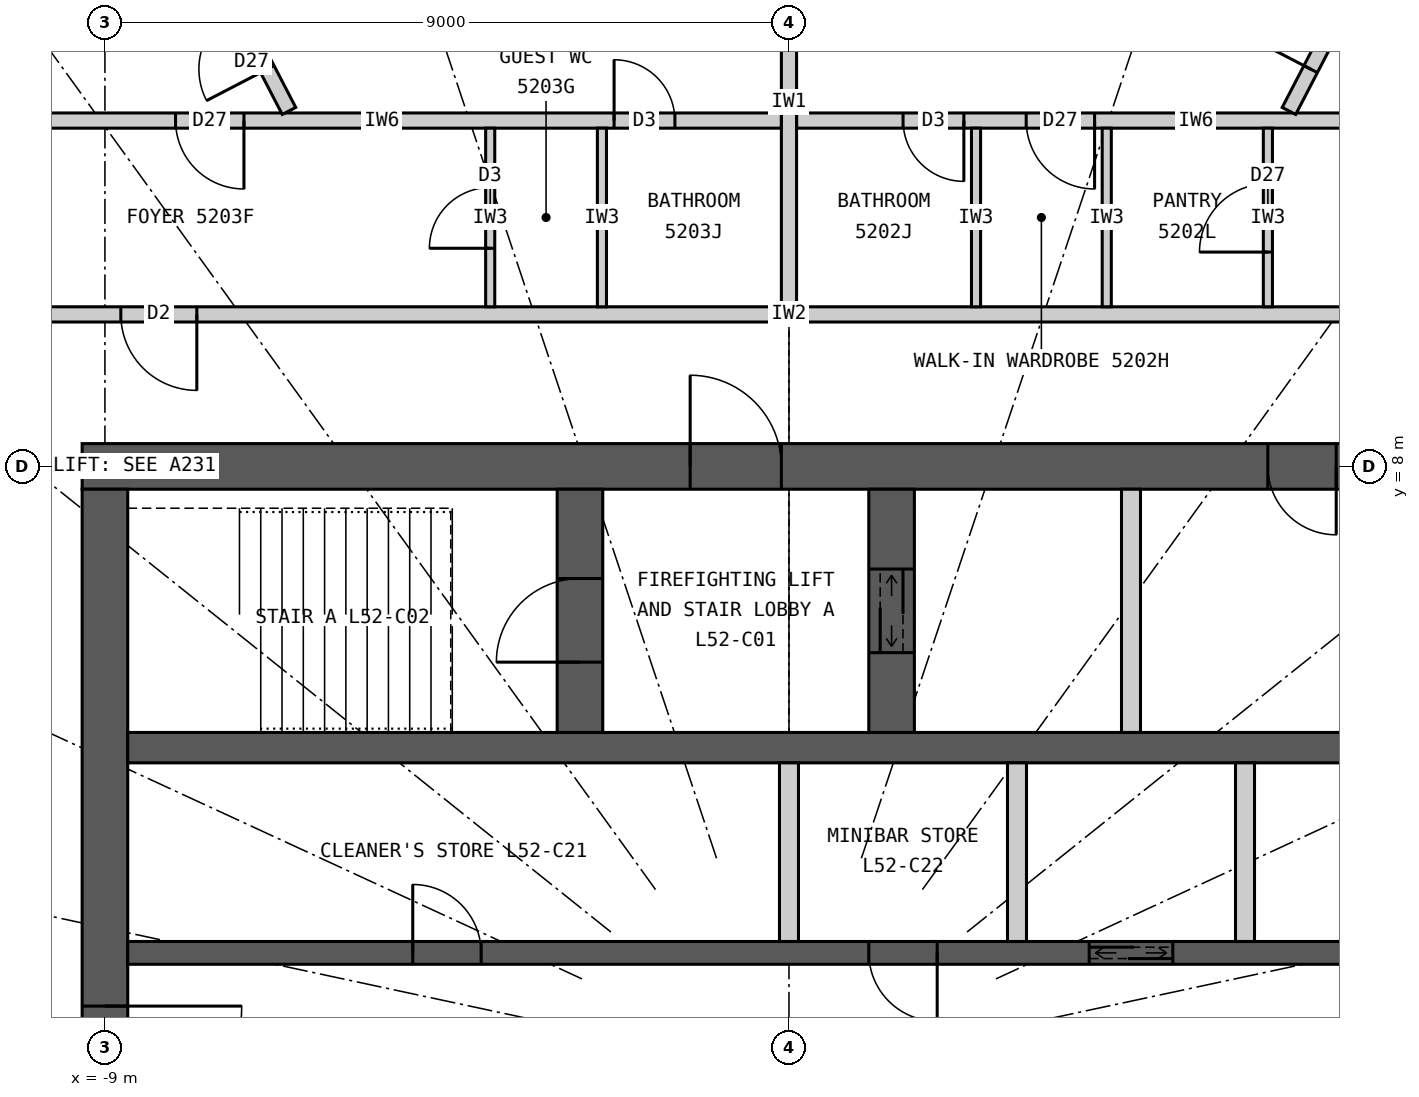
"""IFC4 building model, lengths in metres.
Left out: names, types, materials, properties, quantities, classifications, styles, units other than length and angle.
Written with IfcOpenShell. Run it as: python <this file> out.ifc"""

import sys

from ifc_helpers import new_model, si_unit, direction, frame, frame_2d, origin, origin_2d, place, context, subcontext, project, spatial, rectangle, circle, extrude, element, fill, save


model = new_model("IFC4")
c1 = context("Model", 3, precision=1e-05, world=origin(), true_north=direction((0.0, 1.0)))
c2 = subcontext(c1, "Body", "Model", "MODEL_VIEW")
j1 = project(units=[si_unit("LENGTHUNIT", "METRE"), si_unit("PLANEANGLEUNIT", "RADIAN")], contexts=[c1])
p1 = place(None, origin())
s1 = spatial("IfcSite", under=j1, at=p1, CompositionType="ELEMENT")
p2 = place(p1, origin())
s2 = spatial("IfcBuilding", under=s1, at=p2, CompositionType="ELEMENT")
p3 = place(p2, frame((0.0, 0.0, 196.2)))
s3 = spatial("IfcBuildingStorey", under=s2, at=p3, CompositionType="ELEMENT", Elevation=196.2)
p4 = place(p3, frame((-10.019, 13.883, 0.0), z_axis=(0.0, 0.0, 1.0), x_axis=(1.0, 0.0, 0.0)))
e1 = element("IfcColumn", 1, at=p4, inside=s3, PredefinedType="COLUMN", context=c2, shape_type="SweptSolid", body=[
    extrude(circle(Radius=0.45, at=origin_2d()), origin(), (0.0, 0.0, 1.0), 3.3),
])
p5 = place(p3, frame((-9.3, 8.0, 0.0), z_axis=(0.0, 0.0, 1.0), x_axis=(1.0, 0.0, 0.0)))
e2 = element("IfcWall", 2, at=p5, inside=s3, PredefinedType="SHEAR", context=c2, shape_type="SweptSolid", body=[
    extrude(rectangle(XDim=18.6, YDim=0.6, at=frame_2d((9.3, 0.0))), origin(), (0.0, 0.0, 1.0), 3.3),
])
p6 = place(p5, frame((8.0, 0.0, 0.0)))
e3 = element("IfcOpeningElement", 3, at=p6, cuts=e2, PredefinedType="OPENING", context=c2, shape_type="SweptSolid", body=[
    extrude(rectangle(XDim=1.2, YDim=2.2, at=frame_2d((0.6, 1.1))), frame((0.0, 0.31, 0.0), z_axis=(0.0, -1.0, 0.0), x_axis=(1.0, 0.0, 0.0)), (0.0, 0.0, 1.0), 0.62),
])
p7 = place(p5, frame((15.6, 0.0, 0.0)))
e4 = element("IfcOpeningElement", 4, at=p7, cuts=e2, PredefinedType="OPENING", context=c2, shape_type="SweptSolid", body=[
    extrude(rectangle(XDim=0.9, YDim=2.2, at=frame_2d((0.45, 1.1))), frame((0.0, 0.31, 0.0), z_axis=(0.0, -1.0, 0.0), x_axis=(1.0, 0.0, 0.0)), (0.0, 0.0, 1.0), 0.62),
])
p8 = place(p3, frame((-9.0, 7.7, 0.0), z_axis=(0.0, 0.0, 1.0), x_axis=(0.0, -1.0, 0.0)))
e5 = element("IfcWall", 5, at=p8, inside=s3, PredefinedType="SHEAR", context=c2, shape_type="SweptSolid", body=[
    extrude(rectangle(XDim=15.4, YDim=0.6, at=frame_2d((7.7, 0.0))), origin(), (0.0, 0.0, 1.0), 3.3),
])
p9 = place(p8, frame((6.8, 0.0, 0.0)))
e6 = element("IfcOpeningElement", 6, at=p9, cuts=e5, PredefinedType="OPENING", context=c2, shape_type="SweptSolid", body=[
    extrude(rectangle(XDim=1.8, YDim=2.2, at=frame_2d((0.9, 1.1))), frame((0.0, 0.31, 0.0), z_axis=(0.0, -1.0, 0.0), x_axis=(1.0, 0.0, 0.0)), (0.0, 0.0, 1.0), 0.62),
])
p10 = place(p3, frame((-8.7, 4.3, 0.0), z_axis=(0.0, 0.0, 1.0), x_axis=(1.0, 0.0, 0.0)))
e7 = element("IfcWall", 7, at=p10, inside=s3, PredefinedType="SHEAR", context=c2, shape_type="SweptSolid", body=[
    extrude(rectangle(XDim=17.4, YDim=0.4, at=frame_2d((8.7, 0.0))), origin(), (0.0, 0.0, 1.0), 3.3),
])
p11 = place(p3, frame((-8.7, 1.6, 0.0), z_axis=(0.0, 0.0, 1.0), x_axis=(1.0, 0.0, 0.0)))
e8 = element("IfcWall", 8, at=p11, inside=s3, PredefinedType="SHEAR", context=c2, shape_type="SweptSolid", body=[
    extrude(rectangle(XDim=17.4, YDim=0.3, at=frame_2d((8.7, 0.0))), origin(), (0.0, 0.0, 1.0), 3.3),
])
p12 = place(p11, frame((12.65, 0.0, 0.0)))
e9 = element("IfcOpeningElement", 9, at=p12, cuts=e8, PredefinedType="OPENING", context=c2, shape_type="SweptSolid", body=[
    extrude(rectangle(XDim=1.1, YDim=2.2, at=frame_2d((0.55, 1.1))), frame((0.0, 0.16, 0.0), z_axis=(0.0, -1.0, 0.0), x_axis=(1.0, 0.0, 0.0)), (0.0, 0.0, 1.0), 0.32),
])
p13 = place(p11, frame((3.75, 0.0, 0.0)))
e10 = element("IfcOpeningElement", 10, at=p13, cuts=e8, PredefinedType="OPENING", context=c2, shape_type="SweptSolid", body=[
    extrude(rectangle(XDim=0.9, YDim=2.2, at=frame_2d((0.45, 1.1))), frame((0.0, 0.16, 0.0), z_axis=(0.0, -1.0, 0.0), x_axis=(1.0, 0.0, 0.0)), (0.0, 0.0, 1.0), 0.32),
])
p14 = place(p11, frame((9.75, 0.0, 0.0)))
e11 = element("IfcOpeningElement", 11, at=p14, cuts=e8, PredefinedType="OPENING", context=c2, shape_type="SweptSolid", body=[
    extrude(rectangle(XDim=0.9, YDim=2.2, at=frame_2d((0.45, 1.1))), frame((0.0, 0.16, 0.0), z_axis=(0.0, -1.0, 0.0), x_axis=(1.0, 0.0, 0.0)), (0.0, 0.0, 1.0), 0.32),
])
p15 = place(p3, frame((-2.75, 4.5, 0.0), z_axis=(0.0, 0.0, 1.0), x_axis=(0.0, 1.0, 0.0)))
e12 = element("IfcWall", 12, at=p15, inside=s3, PredefinedType="SHEAR", context=c2, shape_type="SweptSolid", body=[
    extrude(rectangle(XDim=3.2, YDim=0.6, at=frame_2d((1.6, 0.0))), origin(), (0.0, 0.0, 1.0), 3.3),
])
p16 = place(p15, frame((0.925, 0.0, 0.0)))
e13 = element("IfcOpeningElement", 13, at=p16, cuts=e12, PredefinedType="OPENING", context=c2, shape_type="SweptSolid", body=[
    extrude(rectangle(XDim=1.1, YDim=2.2, at=frame_2d((0.55, 1.1))), frame((0.0, 0.31, 0.0), z_axis=(0.0, -1.0, 0.0), x_axis=(1.0, 0.0, 0.0)), (0.0, 0.0, 1.0), 0.62),
])
p17 = place(p3, frame((1.35, 4.5, 0.0), z_axis=(0.0, 0.0, 1.0), x_axis=(0.0, 1.0, 0.0)))
e14 = element("IfcWall", 14, at=p17, inside=s3, PredefinedType="SHEAR", context=c2, shape_type="SweptSolid", body=[
    extrude(rectangle(XDim=3.2, YDim=0.6, at=frame_2d((1.6, 0.0))), origin(), (0.0, 0.0, 1.0), 3.3),
])
p18 = place(p17, frame((1.05, 0.0, 0.0)))
e15 = element("IfcOpeningElement", 15, at=p18, cuts=e14, PredefinedType="OPENING", context=c2, shape_type="SweptSolid", body=[
    extrude(rectangle(XDim=1.1, YDim=2.2, at=frame_2d((0.55, 1.1))), frame((0.0, 0.31, 0.0), z_axis=(0.0, -1.0, 0.0), x_axis=(1.0, 0.0, 0.0)), (0.0, 0.0, 1.0), 0.62),
])
p19 = place(p3, frame((4.5, 4.5, 0.0), z_axis=(0.0, 0.0, 1.0), x_axis=(0.0, 1.0, 0.0)))
e16 = element("IfcWall", 16, at=p19, inside=s3, PredefinedType="PARTITIONING", context=c2, shape_type="SweptSolid", body=[
    extrude(rectangle(XDim=3.2, YDim=0.25, at=frame_2d((1.6, 0.0))), origin(), (0.0, 0.0, 1.0), 3.3),
])
for number, where, z_axis, x_axis in (
    (17, (0.0, 1.75, 0.0), (0.0, 0.0, 1.0), (0.0, 1.0, 0.0)),
    (18, (3.0, 1.75, 0.0), (0.0, 0.0, 1.0), (0.0, 1.0, 0.0)),
    (19, (6.0, 1.75, 0.0), (0.0, 0.0, 1.0), (0.0, 1.0, 0.0)),
):
    element("IfcWall", number, at=place(p3, frame(where, z_axis=z_axis, x_axis=x_axis)), inside=s3, PredefinedType="PARTITIONING", context=c2, shape_type="SweptSolid", body=[
        extrude(rectangle(XDim=2.35, YDim=0.25, at=frame_2d((1.175, 0.0))), origin(), (0.0, 0.0, 1.0), 3.3),
    ])
p20 = place(p3, frame((-11.1, 10.0, 0.0), z_axis=(0.0, 0.0, 1.0), x_axis=(1.0, 0.0, 0.0)))
e20 = element("IfcWall", 20, at=p20, inside=s3, PredefinedType="PARTITIONING", context=c2, shape_type="SweptSolid", body=[
    extrude(rectangle(XDim=22.2, YDim=0.2, at=frame_2d((11.1, 0.0))), origin(), (0.0, 0.0, 1.0), 3.12),
])
p21 = place(p20, frame((2.309, 0.0, 0.0)))
e21 = element("IfcOpeningElement", 21, at=p21, cuts=e20, PredefinedType="OPENING", context=c2, shape_type="SweptSolid", body=[
    extrude(rectangle(XDim=1.0, YDim=2.2, at=frame_2d((0.5, 1.1))), frame((0.0, 0.11, 0.0), z_axis=(0.0, -1.0, 0.0), x_axis=(1.0, 0.0, 0.0)), (0.0, 0.0, 1.0), 0.22),
])
p22 = place(p3, frame((0.0, 10.1, 0.0), z_axis=(0.0, 0.0, 1.0), x_axis=(0.0, 1.0, 0.0)))
e22 = element("IfcWall", 22, at=p22, inside=s3, PredefinedType="PARTITIONING", context=c2, shape_type="SweptSolid", body=[
    extrude(rectangle(XDim=5.4, YDim=0.2, at=frame_2d((2.7, 0.0))), origin(), (0.0, 0.0, 1.0), 2.42),
])
p23 = place(p3, frame((10.609, 12.55, 0.0), z_axis=(0.0, 0.0, 1.0), x_axis=(-1.0, 0.0, 0.0)))
e23 = element("IfcWall", 23, at=p23, inside=s3, PredefinedType="PARTITIONING", context=c2, shape_type="SweptSolid", body=[
    extrude(rectangle(XDim=10.508, YDim=0.2, at=frame_2d((5.254, 0.0))), origin(), (0.0, 0.0, 1.0), 3.12),
])
p24 = place(p23, frame((6.588, 0.0, 0.0)))
e24 = element("IfcOpeningElement", 24, at=p24, cuts=e23, PredefinedType="OPENING", context=c2, shape_type="SweptSolid", body=[
    extrude(rectangle(XDim=0.9, YDim=2.1, at=frame_2d((0.45, 1.05))), frame((0.0, 0.11, 0.0), z_axis=(0.0, -1.0, 0.0), x_axis=(1.0, 0.0, 0.0)), (0.0, 0.0, 1.0), 0.22),
])
p25 = place(p23, frame((8.308, 0.0, 0.0)))
e25 = element("IfcOpeningElement", 25, at=p25, cuts=e23, PredefinedType="OPENING", context=c2, shape_type="SweptSolid", body=[
    extrude(rectangle(XDim=0.8, YDim=2.1, at=frame_2d((0.4, 1.05))), frame((0.0, 0.11, 0.0), z_axis=(0.0, -1.0, 0.0), x_axis=(1.0, 0.0, 0.0)), (0.0, 0.0, 1.0), 0.22),
])
p26 = place(p3, frame((6.578, 12.677, 0.0), z_axis=(0.0, 0.0, 1.0), x_axis=(0.460620531465, 0.887597164255, 0.0)))
e26 = element("IfcWall", 26, at=p26, inside=s3, PredefinedType="PARTITIONING", context=c2, shape_type="SweptSolid", body=[
    extrude(rectangle(XDim=2.678, YDim=0.2, at=frame_2d((1.339, 0.0))), origin(), (0.0, 0.0, 1.0), 3.12),
])
p27 = place(p26, frame((0.62, 0.0, 0.0)))
e27 = element("IfcOpeningElement", 27, at=p27, cuts=e26, PredefinedType="OPENING", context=c2, shape_type="SweptSolid", body=[
    extrude(rectangle(XDim=0.9, YDim=2.1, at=frame_2d((0.45, 1.05))), frame((0.0, 0.11, 0.0), z_axis=(0.0, -1.0, 0.0), x_axis=(1.0, 0.0, 0.0)), (0.0, 0.0, 1.0), 0.22),
])
p28 = place(p3, frame((6.301, 10.1, 0.0), z_axis=(0.0, 0.0, 1.0), x_axis=(0.0, 1.0, 0.0)))
e28 = element("IfcWall", 28, at=p28, inside=s3, PredefinedType="PARTITIONING", context=c2, shape_type="SweptSolid", body=[
    extrude(rectangle(XDim=2.35, YDim=0.12, at=frame_2d((1.175, 0.0))), origin(), (0.0, 0.0, 1.0), 3.12),
])
p29 = place(p28, frame((0.72, 0.0, 0.0)))
e29 = element("IfcOpeningElement", 29, at=p29, cuts=e28, PredefinedType="OPENING", context=c2, shape_type="SweptSolid", body=[
    extrude(rectangle(XDim=0.9, YDim=2.1, at=frame_2d((0.45, 1.05))), frame((0.0, 0.07, 0.0), z_axis=(0.0, -1.0, 0.0), x_axis=(1.0, 0.0, 0.0)), (0.0, 0.0, 1.0), 0.14),
])
for number, where, z_axis, x_axis in (
    (30, (4.181, 10.1, 0.0), (0.0, 0.0, 1.0), (0.0, 1.0, 0.0)),
    (31, (2.461, 10.1, 0.0), (0.0, 0.0, 1.0), (0.0, 1.0, 0.0)),
):
    element("IfcWall", number, at=place(p3, frame(where, z_axis=z_axis, x_axis=x_axis)), inside=s3, PredefinedType="PARTITIONING", context=c2, shape_type="SweptSolid", body=[
        extrude(rectangle(XDim=2.35, YDim=0.12, at=frame_2d((1.175, 0.0))), origin(), (0.0, 0.0, 1.0), 3.12),
    ])
p30 = place(p3, frame((-0.101, 12.55, 0.0), z_axis=(0.0, 0.0, 1.0), x_axis=(-1.0, 0.0, 0.0)))
e32 = element("IfcWall", 32, at=p30, inside=s3, PredefinedType="PARTITIONING", context=c2, shape_type="SweptSolid", body=[
    extrude(rectangle(XDim=10.508, YDim=0.2, at=frame_2d((5.254, 0.0))), origin(), (0.0, 0.0, 1.0), 3.12),
])
p31 = place(p30, frame((1.4, 0.0, 0.0)))
e33 = element("IfcOpeningElement", 33, at=p31, cuts=e32, PredefinedType="OPENING", context=c2, shape_type="SweptSolid", body=[
    extrude(rectangle(XDim=0.8, YDim=2.1, at=frame_2d((0.4, 1.05))), frame((0.0, 0.11, 0.0), z_axis=(0.0, -1.0, 0.0), x_axis=(1.0, 0.0, 0.0)), (0.0, 0.0, 1.0), 0.22),
])
p32 = place(p30, frame((7.07, 0.0, 0.0)))
e34 = element("IfcOpeningElement", 34, at=p32, cuts=e32, PredefinedType="OPENING", context=c2, shape_type="SweptSolid", body=[
    extrude(rectangle(XDim=0.9, YDim=2.1, at=frame_2d((0.45, 1.05))), frame((0.0, 0.11, 0.0), z_axis=(0.0, -1.0, 0.0), x_axis=(1.0, 0.0, 0.0)), (0.0, 0.0, 1.0), 0.22),
])
p33 = place(p3, frame((-6.578, 12.677, 0.0), z_axis=(0.0, 0.0, 1.0), x_axis=(-0.460620531465, 0.887597164255, 0.0)))
e35 = element("IfcWall", 35, at=p33, inside=s3, PredefinedType="PARTITIONING", context=c2, shape_type="SweptSolid", body=[
    extrude(rectangle(XDim=2.678, YDim=0.2, at=frame_2d((1.339, 0.0))), origin(), (0.0, 0.0, 1.0), 3.12),
])
p34 = place(p33, frame((0.62, 0.0, 0.0)))
e36 = element("IfcOpeningElement", 36, at=p34, cuts=e35, PredefinedType="OPENING", context=c2, shape_type="SweptSolid", body=[
    extrude(rectangle(XDim=0.9, YDim=2.1, at=frame_2d((0.45, 1.05))), frame((0.0, 0.11, 0.0), z_axis=(0.0, -1.0, 0.0), x_axis=(1.0, 0.0, 0.0)), (0.0, 0.0, 1.0), 0.22),
])
p35 = place(p3, frame((-2.461, 10.1, 0.0), z_axis=(0.0, 0.0, 1.0), x_axis=(0.0, 1.0, 0.0)))
e37 = element("IfcWall", 37, at=p35, inside=s3, PredefinedType="PARTITIONING", context=c2, shape_type="SweptSolid", body=[
    extrude(rectangle(XDim=2.35, YDim=0.12, at=frame_2d((1.175, 0.0))), origin(), (0.0, 0.0, 1.0), 3.12),
])
p36 = place(p3, frame((-3.931, 10.1, 0.0), z_axis=(0.0, 0.0, 1.0), x_axis=(0.0, 1.0, 0.0)))
e38 = element("IfcWall", 38, at=p36, inside=s3, PredefinedType="PARTITIONING", context=c2, shape_type="SweptSolid", body=[
    extrude(rectangle(XDim=2.35, YDim=0.12, at=frame_2d((1.175, 0.0))), origin(), (0.0, 0.0, 1.0), 3.12),
])
p37 = place(p36, frame((0.77, 0.0, 0.0)))
e39 = element("IfcOpeningElement", 39, at=p37, cuts=e38, PredefinedType="OPENING", context=c2, shape_type="SweptSolid", body=[
    extrude(rectangle(XDim=0.8, YDim=2.1, at=frame_2d((0.4, 1.05))), frame((0.0, 0.07, 0.0), z_axis=(0.0, -1.0, 0.0), x_axis=(1.0, 0.0, 0.0)), (0.0, 0.0, 1.0), 0.14),
])
p38 = place(p29, origin())
e40 = element("IfcDoor", 40, at=p38, inside=s3, OperationType="SINGLE_SWING_LEFT", PredefinedType="DOOR", context=c2, shape_type="SweptSolid", body=[
    extrude(rectangle(XDim=0.9, YDim=2.1, at=frame_2d((0.45, 1.05))), frame((0.0, 0.025, 0.0), z_axis=(0.0, -1.0, 0.0), x_axis=(1.0, 0.0, 0.0)), (0.0, 0.0, 1.0), 0.05),
])
fill(e29, e40)
p39 = place(p24, origin())
e41 = element("IfcDoor", 41, at=p39, inside=s3, OperationType="SINGLE_SWING_LEFT", PredefinedType="DOOR", context=c2, shape_type="SweptSolid", body=[
    extrude(rectangle(XDim=0.9, YDim=2.1, at=frame_2d((0.45, 1.05))), frame((0.0, 0.025, 0.0), z_axis=(0.0, -1.0, 0.0), x_axis=(1.0, 0.0, 0.0)), (0.0, 0.0, 1.0), 0.05),
])
fill(e24, e41)
p40 = place(p25, origin())
e42 = element("IfcDoor", 42, at=p40, inside=s3, OperationType="SINGLE_SWING_LEFT", PredefinedType="DOOR", context=c2, shape_type="SweptSolid", body=[
    extrude(rectangle(XDim=0.8, YDim=2.1, at=frame_2d((0.4, 1.05))), frame((0.0, 0.025, 0.0), z_axis=(0.0, -1.0, 0.0), x_axis=(1.0, 0.0, 0.0)), (0.0, 0.0, 1.0), 0.05),
])
fill(e25, e42)
p41 = place(p27, origin())
e43 = element("IfcDoor", 43, at=p41, inside=s3, OperationType="SINGLE_SWING_LEFT", PredefinedType="DOOR", context=c2, shape_type="SweptSolid", body=[
    extrude(rectangle(XDim=0.9, YDim=2.1, at=frame_2d((0.45, 1.05))), frame((0.0, 0.025, 0.0), z_axis=(0.0, -1.0, 0.0), x_axis=(1.0, 0.0, 0.0)), (0.0, 0.0, 1.0), 0.05),
])
fill(e27, e43)
p42 = place(p21, origin())
e44 = element("IfcDoor", 44, at=p42, inside=s3, OperationType="SINGLE_SWING_RIGHT", PredefinedType="DOOR", context=c2, shape_type="SweptSolid", body=[
    extrude(rectangle(XDim=1.0, YDim=2.2, at=frame_2d((0.5, 1.1))), frame((0.0, 0.025, 0.0), z_axis=(0.0, -1.0, 0.0), x_axis=(1.0, 0.0, 0.0)), (0.0, 0.0, 1.0), 0.05),
])
fill(e21, e44)
p43 = place(p31, origin())
e45 = element("IfcDoor", 45, at=p43, inside=s3, OperationType="SINGLE_SWING_RIGHT", PredefinedType="DOOR", context=c2, shape_type="SweptSolid", body=[
    extrude(rectangle(XDim=0.8, YDim=2.1, at=frame_2d((0.4, 1.05))), frame((0.0, 0.025, 0.0), z_axis=(0.0, -1.0, 0.0), x_axis=(1.0, 0.0, 0.0)), (0.0, 0.0, 1.0), 0.05),
])
fill(e33, e45)
p44 = place(p37, origin())
e46 = element("IfcDoor", 46, at=p44, inside=s3, OperationType="SINGLE_SWING_LEFT", PredefinedType="DOOR", context=c2, shape_type="SweptSolid", body=[
    extrude(rectangle(XDim=0.8, YDim=2.1, at=frame_2d((0.4, 1.05))), frame((0.0, 0.025, 0.0), z_axis=(0.0, -1.0, 0.0), x_axis=(1.0, 0.0, 0.0)), (0.0, 0.0, 1.0), 0.05),
])
fill(e39, e46)
p45 = place(p32, origin())
e47 = element("IfcDoor", 47, at=p45, inside=s3, OperationType="SINGLE_SWING_LEFT", PredefinedType="DOOR", context=c2, shape_type="SweptSolid", body=[
    extrude(rectangle(XDim=0.9, YDim=2.1, at=frame_2d((0.45, 1.05))), frame((0.0, 0.025, 0.0), z_axis=(0.0, -1.0, 0.0), x_axis=(1.0, 0.0, 0.0)), (0.0, 0.0, 1.0), 0.05),
])
fill(e34, e47)
p46 = place(p34, origin())
e48 = element("IfcDoor", 48, at=p46, inside=s3, OperationType="SINGLE_SWING_LEFT", PredefinedType="DOOR", context=c2, shape_type="SweptSolid", body=[
    extrude(rectangle(XDim=0.9, YDim=2.1, at=frame_2d((0.45, 1.05))), frame((0.0, 0.025, 0.0), z_axis=(0.0, -1.0, 0.0), x_axis=(1.0, 0.0, 0.0)), (0.0, 0.0, 1.0), 0.05),
])
fill(e36, e48)
p47 = place(p6, origin())
e49 = element("IfcDoor", 49, at=p47, inside=s3, OperationType="SINGLE_SWING_LEFT", PredefinedType="DOOR", context=c2, shape_type="SweptSolid", body=[
    extrude(rectangle(XDim=1.2, YDim=2.2, at=frame_2d((0.6, 1.1))), frame((0.0, 0.025, 0.0), z_axis=(0.0, -1.0, 0.0), x_axis=(1.0, 0.0, 0.0)), (0.0, 0.0, 1.0), 0.05),
])
fill(e3, e49)
p48 = place(p16, origin())
e50 = element("IfcDoor", 50, at=p48, inside=s3, OperationType="SINGLE_SWING_LEFT", PredefinedType="DOOR", context=c2, shape_type="SweptSolid", body=[
    extrude(rectangle(XDim=1.1, YDim=2.2, at=frame_2d((0.55, 1.1))), frame((0.0, 0.025, 0.0), z_axis=(0.0, -1.0, 0.0), x_axis=(1.0, 0.0, 0.0)), (0.0, 0.0, 1.0), 0.05),
])
fill(e13, e50)
p49 = place(p18, origin())
e51 = element("IfcDoor", 51, at=p49, inside=s3, OperationType="DOUBLE_DOOR_SLIDING", PredefinedType="DOOR", context=c2, shape_type="SweptSolid", body=[
    extrude(rectangle(XDim=1.1, YDim=2.2, at=frame_2d((0.55, 1.1))), frame((0.0, 0.025, 0.0), z_axis=(0.0, -1.0, 0.0), x_axis=(1.0, 0.0, 0.0)), (0.0, 0.0, 1.0), 0.05),
])
fill(e15, e51)
p50 = place(p7, origin())
e52 = element("IfcDoor", 52, at=p50, inside=s3, OperationType="SINGLE_SWING_RIGHT", PredefinedType="DOOR", context=c2, shape_type="SweptSolid", body=[
    extrude(rectangle(XDim=0.9, YDim=2.2, at=frame_2d((0.45, 1.1))), frame((0.0, 0.025, 0.0), z_axis=(0.0, -1.0, 0.0), x_axis=(1.0, 0.0, 0.0)), (0.0, 0.0, 1.0), 0.05),
])
fill(e4, e52)
p51 = place(p12, origin())
e53 = element("IfcDoor", 53, at=p51, inside=s3, OperationType="DOUBLE_DOOR_SLIDING", PredefinedType="DOOR", context=c2, shape_type="SweptSolid", body=[
    extrude(rectangle(XDim=1.1, YDim=2.2, at=frame_2d((0.55, 1.1))), frame((0.0, 0.025, 0.0), z_axis=(0.0, -1.0, 0.0), x_axis=(1.0, 0.0, 0.0)), (0.0, 0.0, 1.0), 0.05),
])
fill(e9, e53)
p52 = place(p13, origin())
e54 = element("IfcDoor", 54, at=p52, inside=s3, OperationType="SINGLE_SWING_LEFT", PredefinedType="DOOR", context=c2, shape_type="SweptSolid", body=[
    extrude(rectangle(XDim=0.9, YDim=2.2, at=frame_2d((0.45, 1.1))), frame((0.0, 0.025, 0.0), z_axis=(0.0, -1.0, 0.0), x_axis=(1.0, 0.0, 0.0)), (0.0, 0.0, 1.0), 0.05),
])
fill(e10, e54)
p53 = place(p14, origin())
e55 = element("IfcDoor", 55, at=p53, inside=s3, OperationType="SINGLE_SWING_RIGHT", PredefinedType="DOOR", context=c2, shape_type="SweptSolid", body=[
    extrude(rectangle(XDim=0.9, YDim=2.2, at=frame_2d((0.45, 1.1))), frame((0.0, 0.025, 0.0), z_axis=(0.0, -1.0, 0.0), x_axis=(1.0, 0.0, 0.0)), (0.0, 0.0, 1.0), 0.05),
])
fill(e11, e55)
p54 = place(p9, origin())
e56 = element("IfcDoor", 56, at=p54, inside=s3, OperationType="DOUBLE_DOOR_DOUBLE_SWING", PredefinedType="DOOR", context=c2, shape_type="SweptSolid", body=[
    extrude(rectangle(XDim=1.8, YDim=2.2, at=frame_2d((0.9, 1.1))), frame((0.0, 0.025, 0.0), z_axis=(0.0, -1.0, 0.0), x_axis=(1.0, 0.0, 0.0)), (0.0, 0.0, 1.0), 0.05),
])
fill(e6, e56)
save(model, sys.argv[1])
